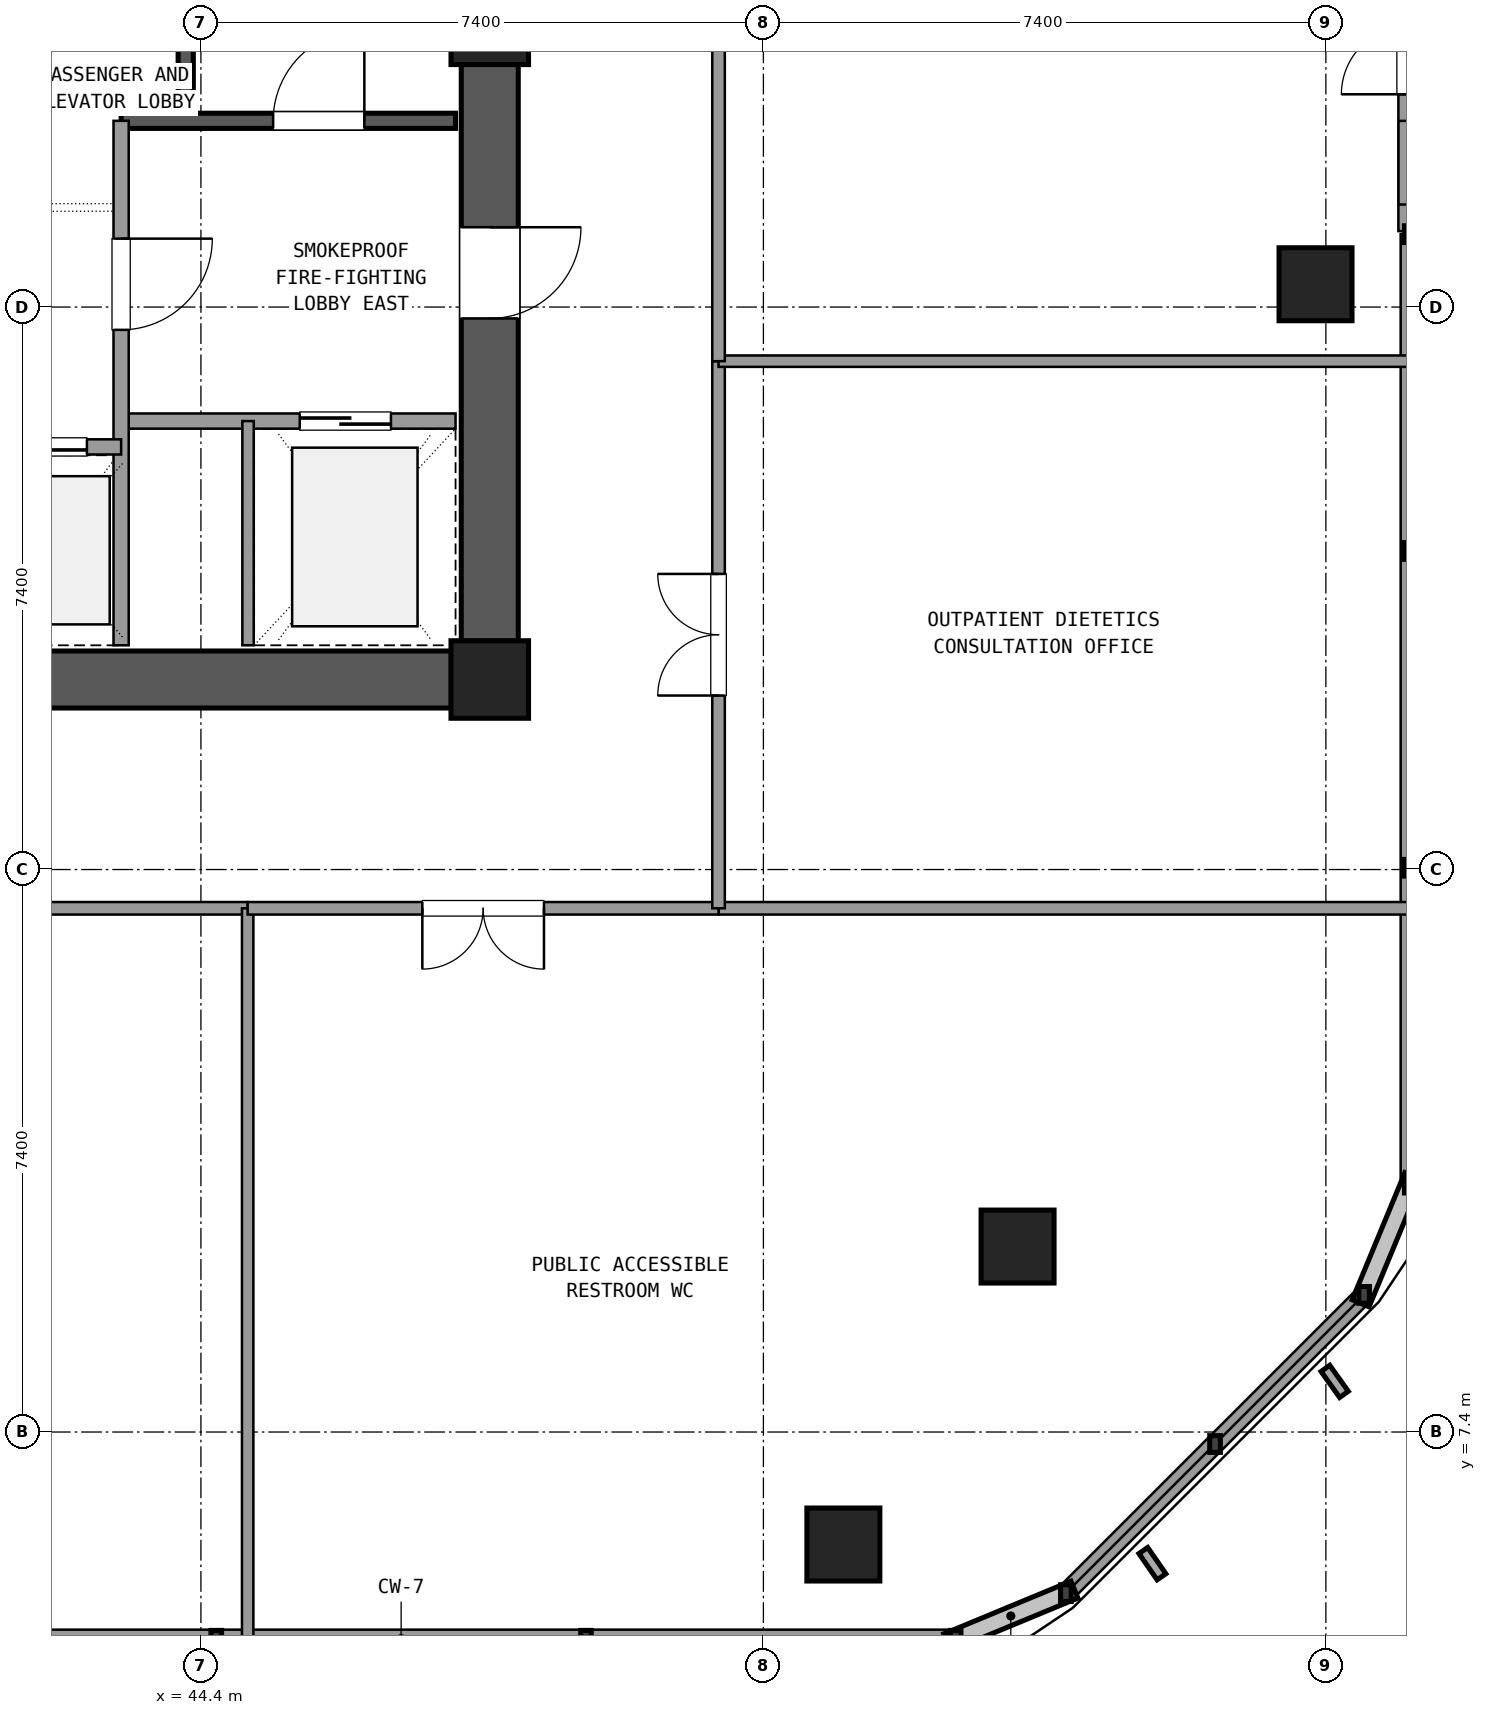
"""IFC4 building model, lengths in metres.
Left out: names, types, materials, properties, quantities, classifications, styles, units other than length and angle.
Written with IfcOpenShell. Run it as: python <this file> out.ifc"""

import sys

from ifc_helpers import new_model, si_unit, direction, frame, frame_2d, origin, origin_2d, place, context, subcontext, project, spatial, rectangle, extrude, element, fill, save


model = new_model("IFC4")
c1 = context("Model", 3, precision=1e-05, world=origin(), true_north=direction((0.0, 1.0)))
c2 = subcontext(c1, "Body", "Model", "MODEL_VIEW")
j1 = project(units=[si_unit("LENGTHUNIT", "METRE"), si_unit("PLANEANGLEUNIT", "RADIAN")], contexts=[c1])
p1 = place(None, origin())
s1 = spatial("IfcSite", under=j1, at=p1, CompositionType="ELEMENT")
p2 = place(p1, origin())
s2 = spatial("IfcBuilding", under=s1, at=p2, CompositionType="ELEMENT")
p3 = place(p2, frame((0.0, 0.0, 129.06)))
s3 = spatial("IfcBuildingStorey", under=s2, at=p3, CompositionType="ELEMENT", Elevation=129.06)
for number, where, z_axis, x_axis in (
    (1, (48.2, 17.3, 0.0), (0.0, 0.0, 1.0), (1.0, 0.0, 0.0)),
    (2, (48.2, 25.9, 0.0), (0.0, 0.0, 1.0), (1.0, 0.0, 0.0)),
):
    element("IfcColumn", number, at=place(p3, frame(where, z_axis=z_axis, x_axis=x_axis)), inside=s3, PredefinedType="COLUMN", context=c2, shape_type="SweptSolid", body=[
        extrude(rectangle(XDim=1.02, YDim=1.02, at=origin_2d()), origin(), (0.0, 0.0, 1.0), 5.76),
    ])
p4 = place(p3, frame((37.505, 17.3, 0.0), z_axis=(0.0, 0.0, 1.0), x_axis=(1.0, 0.0, 0.0)))
e3 = element("IfcWall", 3, at=p4, inside=s3, PredefinedType="SHEAR", context=c2, shape_type="SweptSolid", body=[
    extrude(rectangle(XDim=10.19, YDim=0.75, at=frame_2d((5.095, 0.0))), origin(), (0.0, 0.0, 1.0), 5.48),
])
p5 = place(p3, frame((48.2, 17.805, 0.0), z_axis=(0.0, 0.0, 1.0), x_axis=(0.0, 1.0, 0.0)))
e4 = element("IfcWall", 4, at=p5, inside=s3, PredefinedType="SHEAR", context=c2, shape_type="SweptSolid", body=[
    extrude(rectangle(XDim=7.59, YDim=0.75, at=frame_2d((3.795, 0.0))), origin(), (0.0, 0.0, 1.0), 5.48),
])
p6 = place(p5, frame((4.245, 0.0, 0.0)))
e5 = element("IfcOpeningElement", 5, at=p6, cuts=e4, PredefinedType="OPENING", context=c2, shape_type="SweptSolid", body=[
    extrude(rectangle(XDim=1.2, YDim=2.15, at=frame_2d((0.6, 1.075))), frame((0.0, 0.385, 0.0), z_axis=(0.0, -1.0, 0.0), x_axis=(1.0, 0.0, 0.0)), (0.0, 0.0, 1.0), 0.77),
])
for number, where, z_axis, x_axis in (
    (6, (52.852, 5.92, 0.023), (0.0, 0.0, 1.0), (1.0, 0.0, 0.0)),
    (7, (55.144, 9.84, 0.023), (0.0, 0.0, 1.0), (1.0, 0.0, 0.0)),
):
    element("IfcColumn", number, at=place(p3, frame(where, z_axis=z_axis, x_axis=x_axis)), inside=s3, PredefinedType="COLUMN", context=c2, shape_type="SweptSolid", body=[
        extrude(rectangle(XDim=0.96, YDim=0.96, at=origin_2d()), origin(), (0.0, 0.0, 1.0), 5.737),
    ])
p7 = place(p3, frame((59.064, 22.5, 0.021), z_axis=(0.0, 0.0, 1.0), x_axis=(1.0, 0.0, 0.0)))
e8 = element("IfcColumn", 8, at=p7, inside=s3, PredefinedType="COLUMN", context=c2, shape_type="SweptSolid", body=[
    extrude(rectangle(XDim=0.96, YDim=0.96, at=origin_2d()), origin(), (0.0, 0.0, 1.0), 5.739),
])
p8 = place(p3, frame((39.739, 4.68, 0.0), z_axis=(0.0, 0.0, 1.0), x_axis=(1.0, 0.0, 0.0)))
e9 = element("IfcWall", 9, at=p8, inside=s3, PredefinedType="SOLIDWALL", context=c2, shape_type="SweptSolid", body=[
    extrude(rectangle(XDim=14.59, YDim=0.24, at=frame_2d((7.295, 0.0))), origin(), (0.0, 0.0, 1.0), 0.85),
])
p9 = place(p3, frame((55.78, 5.281, 0.0), z_axis=(0.0, 0.0, 1.0), x_axis=(0.707084777957, 0.707128783731, 0.0)))
e10 = element("IfcWall", 10, at=p9, inside=s3, PredefinedType="SOLIDWALL", context=c2, shape_type="SweptSolid", body=[
    extrude(rectangle(XDim=5.548, YDim=0.24, at=frame_2d((2.774, 0.0))), origin(), (0.0, 0.0, 1.0), 0.85),
])
p10 = place(p3, frame((60.304, 23.199, 0.0), z_axis=(0.0, 0.0, 1.0), x_axis=(0.0, 1.0, 0.0)))
e11 = element("IfcWall", 11, at=p10, inside=s3, PredefinedType="SOLIDWALL", context=c2, shape_type="SweptSolid", body=[
    extrude(rectangle(XDim=5.4, YDim=0.3, at=frame_2d((2.7, 0.0))), origin(), (0.0, 0.0, 1.0), 4.83),
])
p11 = place(p10, frame((1.8, 0.0, 0.0)))
e12 = element("IfcOpeningElement", 12, at=p11, cuts=e11, PredefinedType="OPENING", context=c2, shape_type="SweptSolid", body=[
    extrude(rectangle(XDim=1.8, YDim=2.25, at=frame_2d((0.9, 1.125))), frame((0.0, 0.16, 0.0), z_axis=(0.0, -1.0, 0.0), x_axis=(1.0, 0.0, 0.0)), (0.0, 0.0, 1.0), 0.32),
])
p12 = place(p10, frame((0.35, 0.0, 0.4)))
e13 = element("IfcOpeningElement", 13, at=p12, cuts=e11, PredefinedType="OPENING", context=c2, shape_type="SweptSolid", body=[
    extrude(rectangle(XDim=1.1, YDim=1.8, at=frame_2d((0.55, 0.9))), frame((0.0, 0.16, 0.0), z_axis=(0.0, -1.0, 0.0), x_axis=(1.0, 0.0, 0.0)), (0.0, 0.0, 1.0), 0.32),
])
p13 = place(p10, frame((3.95, 0.0, 0.4)))
e14 = element("IfcOpeningElement", 14, at=p13, cuts=e11, PredefinedType="OPENING", context=c2, shape_type="SweptSolid", body=[
    extrude(rectangle(XDim=1.1, YDim=1.8, at=frame_2d((0.55, 0.9))), frame((0.0, 0.16, 0.0), z_axis=(0.0, -1.0, 0.0), x_axis=(1.0, 0.0, 0.0)), (0.0, 0.0, 1.0), 0.32),
])
p14 = place(p3, frame((60.304, 10.655, 0.0), z_axis=(0.0, 0.0, 1.0), x_axis=(0.0, 1.0, 0.0)))
e15 = element("IfcWall", 15, at=p14, inside=s3, PredefinedType="SOLIDWALL", context=c2, shape_type="SweptSolid", body=[
    extrude(rectangle(XDim=12.504, YDim=0.24, at=frame_2d((6.252, 0.0))), origin(), (0.0, 0.0, 1.0), 0.85),
])
p15 = place(p3, frame((44.2, 24.65, 0.0), z_axis=(0.0, 0.0, 1.0), x_axis=(0.0, 1.0, 0.0)))
e16 = element("IfcWall", 16, at=p15, inside=s3, PredefinedType="SHEAR", context=c2, shape_type="SweptSolid", body=[
    extrude(rectangle(XDim=9.4, YDim=0.2, at=frame_2d((4.7, 0.0))), origin(), (0.0, 0.0, 1.0), 5.48),
])
p16 = place(p3, frame((43.35, 24.65, 0.0), z_axis=(0.0, 0.0, 1.0), x_axis=(1.0, 0.0, 0.0)))
e17 = element("IfcWall", 17, at=p16, inside=s3, PredefinedType="SHEAR", context=c2, shape_type="SweptSolid", body=[
    extrude(rectangle(XDim=4.4, YDim=0.2, at=frame_2d((2.2, 0.0))), origin(), (0.0, 0.0, 1.0), 5.48),
])
p17 = place(p16, frame((2.0, 0.0, 0.0)))
e18 = element("IfcOpeningElement", 18, at=p17, cuts=e17, PredefinedType="OPENING", context=c2, shape_type="SweptSolid", body=[
    extrude(rectangle(XDim=1.2, YDim=2.15, at=frame_2d((0.6, 1.075))), frame((0.0, 0.11, 0.0), z_axis=(0.0, -1.0, 0.0), x_axis=(1.0, 0.0, 0.0)), (0.0, 0.0, 1.0), 0.22),
])
p18 = place(p3, frame((43.35, 20.7, 0.0), z_axis=(0.0, 0.0, 1.0), x_axis=(1.0, 0.0, 0.0)))
e19 = element("IfcWall", 19, at=p18, inside=s3, PredefinedType="SOLIDWALL", context=c2, shape_type="SweptSolid", body=[
    extrude(rectangle(XDim=4.4, YDim=0.2, at=frame_2d((2.2, 0.0))), origin(), (0.0, 0.0, 1.0), 4.77),
])
p19 = place(p18, frame((2.35, 0.0, 0.0)))
e20 = element("IfcOpeningElement", 20, at=p19, cuts=e19, PredefinedType="OPENING", context=c2, shape_type="SweptSolid", body=[
    extrude(rectangle(XDim=1.2, YDim=2.15, at=frame_2d((0.6, 1.075))), frame((0.0, 0.11, 0.0), z_axis=(0.0, -1.0, 0.0), x_axis=(1.0, 0.0, 0.0)), (0.0, 0.0, 1.0), 0.22),
])
p20 = place(p3, frame((43.35, 17.75, 0.0), z_axis=(0.0, 0.0, 1.0), x_axis=(0.0, 1.0, 0.0)))
e21 = element("IfcWall", 21, at=p20, inside=s3, PredefinedType="SOLIDWALL", context=c2, shape_type="SweptSolid", body=[
    extrude(rectangle(XDim=6.9, YDim=0.2, at=frame_2d((3.45, 0.0))), origin(), (0.0, 0.0, 1.0), 4.77),
])
p21 = place(p20, frame((4.15, 0.0, 0.0)))
e22 = element("IfcOpeningElement", 22, at=p21, cuts=e21, PredefinedType="OPENING", context=c2, shape_type="SweptSolid", body=[
    extrude(rectangle(XDim=1.2, YDim=2.15, at=frame_2d((0.6, 1.075))), frame((0.0, 0.11, 0.0), z_axis=(0.0, -1.0, 0.0), x_axis=(1.0, 0.0, 0.0)), (0.0, 0.0, 1.0), 0.22),
])
p22 = place(p3, frame((45.02, 17.75, 0.0), z_axis=(0.0, 0.0, 1.0), x_axis=(0.0, 1.0, 0.0)))
e23 = element("IfcWall", 23, at=p22, inside=s3, PredefinedType="PARTITIONING", context=c2, shape_type="SweptSolid", body=[
    extrude(rectangle(XDim=2.95, YDim=0.15, at=frame_2d((1.475, 0.0))), origin(), (0.0, 0.0, 1.0), 4.77),
])
p23 = place(p3, frame((37.25, 20.36, 0.0), z_axis=(0.0, 0.0, 1.0), x_axis=(1.0, 0.0, 0.0)))
e24 = element("IfcWall", 24, at=p23, inside=s3, PredefinedType="SOLIDWALL", context=c2, shape_type="SweptSolid", body=[
    extrude(rectangle(XDim=6.1, YDim=0.2, at=frame_2d((3.05, 0.0))), origin(), (0.0, 0.0, 1.0), 4.77),
])
p24 = place(p23, frame((0.45, 0.0, 0.0)))
e25 = element("IfcOpeningElement", 25, at=p24, cuts=e24, PredefinedType="OPENING", context=c2, shape_type="SweptSolid", body=[
    extrude(rectangle(XDim=1.1, YDim=2.15, at=frame_2d((0.55, 1.075))), frame((0.0, 0.11, 0.0), z_axis=(0.0, -1.0, 0.0), x_axis=(1.0, 0.0, 0.0)), (0.0, 0.0, 1.0), 0.22),
])
p25 = place(p23, frame((2.5, 0.0, 0.0)))
e26 = element("IfcOpeningElement", 26, at=p25, cuts=e24, PredefinedType="OPENING", context=c2, shape_type="SweptSolid", body=[
    extrude(rectangle(XDim=1.1, YDim=2.15, at=frame_2d((0.55, 1.075))), frame((0.0, 0.11, 0.0), z_axis=(0.0, -1.0, 0.0), x_axis=(1.0, 0.0, 0.0)), (0.0, 0.0, 1.0), 0.22),
])
p26 = place(p23, frame((4.55, 0.0, 0.0)))
e27 = element("IfcOpeningElement", 27, at=p26, cuts=e24, PredefinedType="OPENING", context=c2, shape_type="SweptSolid", body=[
    extrude(rectangle(XDim=1.1, YDim=2.15, at=frame_2d((0.55, 1.075))), frame((0.0, 0.11, 0.0), z_axis=(0.0, -1.0, 0.0), x_axis=(1.0, 0.0, 0.0)), (0.0, 0.0, 1.0), 0.22),
])
p27 = place(p3, frame((51.21, 14.29, 0.0), z_axis=(0.0, 0.0, 1.0), x_axis=(1.0, 0.0, 0.0)))
e28 = element("IfcWall", 28, at=p27, inside=s3, PredefinedType="PARTITIONING", context=c2, shape_type="SweptSolid", body=[
    extrude(rectangle(XDim=9.074, YDim=0.165, at=frame_2d((4.537, 0.0))), origin(), (0.0, 0.0, 1.0), 4.77),
])
p28 = place(p3, frame((27.649, 14.29, 0.0), z_axis=(0.0, 0.0, 1.0), x_axis=(1.0, 0.0, 0.0)))
e29 = element("IfcWall", 29, at=p28, inside=s3, PredefinedType="PARTITIONING", context=c2, shape_type="SweptSolid", body=[
    extrude(rectangle(XDim=17.366, YDim=0.165, at=frame_2d((8.683, 0.0))), origin(), (0.0, 0.0, 1.0), 4.77),
])
p29 = place(p28, frame((7.38, 0.0, 0.0)))
e30 = element("IfcOpeningElement", 30, at=p29, cuts=e29, PredefinedType="OPENING", context=c2, shape_type="SweptSolid", body=[
    extrude(rectangle(XDim=1.6, YDim=2.2, at=frame_2d((0.8, 1.1))), frame((0.0, 0.093, 0.0), z_axis=(0.0, -1.0, 0.0), x_axis=(1.0, 0.0, 0.0)), (0.0, 0.0, 1.0), 0.185),
])
p30 = place(p3, frame((45.015, 14.29, 0.0), z_axis=(0.0, 0.0, 1.0), x_axis=(0.0, -1.0, 0.0)))
e31 = element("IfcWall", 31, at=p30, inside=s3, PredefinedType="PARTITIONING", context=c2, shape_type="SweptSolid", body=[
    extrude(rectangle(XDim=9.59, YDim=0.15, at=frame_2d((4.795, 0.0))), origin(), (0.0, 0.0, 1.0), 4.77),
])
p31 = place(p3, frame((45.015, 14.29, 0.0), z_axis=(0.0, 0.0, 1.0), x_axis=(1.0, 0.0, 0.0)))
e32 = element("IfcWall", 32, at=p31, inside=s3, PredefinedType="PARTITIONING", context=c2, shape_type="SweptSolid", body=[
    extrude(rectangle(XDim=6.195, YDim=0.165, at=frame_2d((3.098, 0.0))), origin(), (0.0, 0.0, 1.0), 4.77),
])
p32 = place(p31, frame((2.298, 0.0, 0.0)))
e33 = element("IfcOpeningElement", 33, at=p32, cuts=e32, PredefinedType="OPENING", context=c2, shape_type="SweptSolid", body=[
    extrude(rectangle(XDim=1.6, YDim=2.2, at=frame_2d((0.8, 1.1))), frame((0.0, 0.093, 0.0), z_axis=(0.0, -1.0, 0.0), x_axis=(1.0, 0.0, 0.0)), (0.0, 0.0, 1.0), 0.185),
])
p33 = place(p3, frame((51.21, 14.29, 0.0), z_axis=(0.0, 0.0, 1.0), x_axis=(0.0, 1.0, 0.0)))
e34 = element("IfcWall", 34, at=p33, inside=s3, PredefinedType="PARTITIONING", context=c2, shape_type="SweptSolid", body=[
    extrude(rectangle(XDim=7.198, YDim=0.165, at=frame_2d((3.599, 0.0))), origin(), (0.0, 0.0, 1.0), 4.77),
])
p34 = place(p33, frame((2.799, 0.0, 0.0)))
e35 = element("IfcOpeningElement", 35, at=p34, cuts=e34, PredefinedType="OPENING", context=c2, shape_type="SweptSolid", body=[
    extrude(rectangle(XDim=1.6, YDim=2.2, at=frame_2d((0.8, 1.1))), frame((0.0, 0.093, 0.0), z_axis=(0.0, -1.0, 0.0), x_axis=(1.0, 0.0, 0.0)), (0.0, 0.0, 1.0), 0.185),
])
p35 = place(p3, frame((51.21, 21.488, 0.0), z_axis=(0.0, 0.0, 1.0), x_axis=(1.0, 0.0, 0.0)))
e36 = element("IfcWall", 36, at=p35, inside=s3, PredefinedType="PARTITIONING", context=c2, shape_type="SweptSolid", body=[
    extrude(rectangle(XDim=9.074, YDim=0.15, at=frame_2d((4.537, 0.0))), origin(), (0.0, 0.0, 1.0), 4.77),
])
p36 = place(p3, frame((51.21, 21.488, 0.0), z_axis=(0.0, 0.0, 1.0), x_axis=(0.0, 1.0, 0.0)))
e37 = element("IfcWall", 37, at=p36, inside=s3, PredefinedType="PARTITIONING", context=c2, shape_type="SweptSolid", body=[
    extrude(rectangle(XDim=16.022, YDim=0.165, at=frame_2d((8.011, 0.0))), origin(), (0.0, 0.0, 1.0), 4.77),
])
p37 = place(p36, frame((7.211, 0.0, 0.0)))
e38 = element("IfcOpeningElement", 38, at=p37, cuts=e37, PredefinedType="OPENING", context=c2, shape_type="SweptSolid", body=[
    extrude(rectangle(XDim=1.6, YDim=2.2, at=frame_2d((0.8, 1.1))), frame((0.0, 0.093, 0.0), z_axis=(0.0, -1.0, 0.0), x_axis=(1.0, 0.0, 0.0)), (0.0, 0.0, 1.0), 0.185),
])
p38 = place(p17, origin())
e39 = element("IfcDoor", 39, at=p38, inside=s3, OperationType="SINGLE_SWING_RIGHT", PredefinedType="DOOR", context=c2, shape_type="SweptSolid", body=[
    extrude(rectangle(XDim=1.2, YDim=2.15, at=frame_2d((0.6, 1.075))), frame((0.0, 0.025, 0.0), z_axis=(0.0, -1.0, 0.0), x_axis=(1.0, 0.0, 0.0)), (0.0, 0.0, 1.0), 0.05),
])
fill(e18, e39)
p39 = place(p19, origin())
e40 = element("IfcDoor", 40, at=p39, inside=s3, OperationType="SLIDING_TO_RIGHT", PredefinedType="DOOR", context=c2, shape_type="SweptSolid", body=[
    extrude(rectangle(XDim=1.2, YDim=2.15, at=frame_2d((0.6, 1.075))), frame((0.0, 0.025, 0.0), z_axis=(0.0, -1.0, 0.0), x_axis=(1.0, 0.0, 0.0)), (0.0, 0.0, 1.0), 0.05),
])
fill(e20, e40)
p40 = place(p21, frame((1.2, 0.0, 0.0), z_axis=(0.0, 0.0, 1.0), x_axis=(-1.0, 0.0, 0.0)))
e41 = element("IfcDoor", 41, at=p40, inside=s3, OperationType="SINGLE_SWING_RIGHT", PredefinedType="DOOR", context=c2, shape_type="SweptSolid", body=[
    extrude(rectangle(XDim=1.2, YDim=2.15, at=frame_2d((0.6, 1.075))), frame((0.0, 0.025, 0.0), z_axis=(0.0, -1.0, 0.0), x_axis=(1.0, 0.0, 0.0)), (0.0, 0.0, 1.0), 0.05),
])
fill(e22, e41)
p41 = place(p6, frame((1.2, 0.0, 0.0), z_axis=(0.0, 0.0, 1.0), x_axis=(-1.0, 0.0, 0.0)))
e42 = element("IfcDoor", 42, at=p41, inside=s3, OperationType="SINGLE_SWING_RIGHT", PredefinedType="DOOR", context=c2, shape_type="SweptSolid", body=[
    extrude(rectangle(XDim=1.2, YDim=2.15, at=frame_2d((0.6, 1.075))), frame((0.0, 0.025, 0.0), z_axis=(0.0, -1.0, 0.0), x_axis=(1.0, 0.0, 0.0)), (0.0, 0.0, 1.0), 0.05),
])
fill(e5, e42)
p42 = place(p26, origin())
e43 = element("IfcDoor", 43, at=p42, inside=s3, OperationType="SLIDING_TO_LEFT", PredefinedType="DOOR", context=c2, shape_type="SweptSolid", body=[
    extrude(rectangle(XDim=1.1, YDim=2.15, at=frame_2d((0.55, 1.075))), frame((0.0, 0.025, 0.0), z_axis=(0.0, -1.0, 0.0), x_axis=(1.0, 0.0, 0.0)), (0.0, 0.0, 1.0), 0.05),
])
fill(e27, e43)
p43 = place(p32, frame((1.6, 0.0, 0.0), z_axis=(0.0, 0.0, 1.0), x_axis=(-1.0, 0.0, 0.0)))
e44 = element("IfcDoor", 44, at=p43, inside=s3, OperationType="DOUBLE_DOOR_SINGLE_SWING", PredefinedType="DOOR", context=c2, shape_type="SweptSolid", body=[
    extrude(rectangle(XDim=1.6, YDim=2.2, at=frame_2d((0.8, 1.1))), frame((0.0, 0.025, 0.0), z_axis=(0.0, -1.0, 0.0), x_axis=(1.0, 0.0, 0.0)), (0.0, 0.0, 1.0), 0.05),
])
fill(e33, e44)
p44 = place(p34, origin())
e45 = element("IfcDoor", 45, at=p44, inside=s3, OperationType="DOUBLE_DOOR_SINGLE_SWING", PredefinedType="DOOR", context=c2, shape_type="SweptSolid", body=[
    extrude(rectangle(XDim=1.6, YDim=2.2, at=frame_2d((0.8, 1.1))), frame((0.0, 0.025, 0.0), z_axis=(0.0, -1.0, 0.0), x_axis=(1.0, 0.0, 0.0)), (0.0, 0.0, 1.0), 0.05),
])
fill(e35, e45)
save(model, sys.argv[1])
